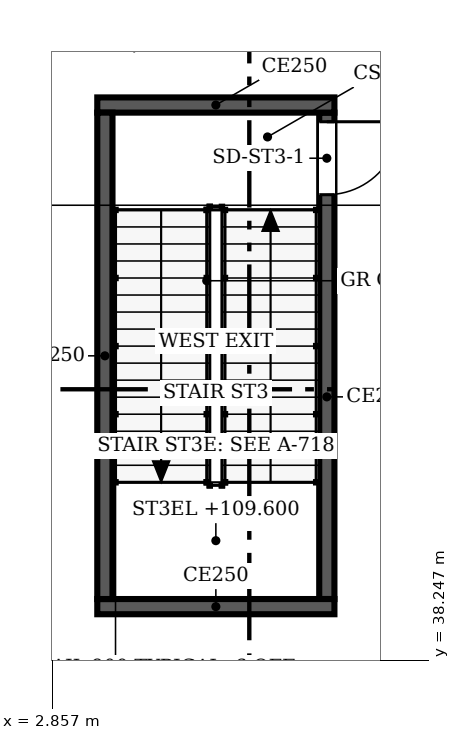
"""IFC4 building model, lengths in metres.
Left out: names, types, materials, properties, quantities, classifications, styles, units other than length and angle.
Written with IfcOpenShell. Run it as: python <this file> out.ifc"""

import sys

from ifc_helpers import new_model, si_unit, direction, frame, frame_2d, origin, place, context, subcontext, project, spatial, rectangle, extrude, source, transform, mapped, element, fill, save


model = new_model("IFC4")
c1 = context("Model", 3, precision=1e-05, world=origin(), true_north=direction((0.0, 1.0)))
c2 = subcontext(c1, "Body", "Model", "MODEL_VIEW")
j1 = project(units=[si_unit("LENGTHUNIT", "METRE"), si_unit("PLANEANGLEUNIT", "RADIAN")], contexts=[c1])
p1 = place(None, origin())
s1 = spatial("IfcSite", under=j1, at=p1, CompositionType="ELEMENT")
p2 = place(p1, origin())
s2 = spatial("IfcBuilding", under=s1, at=p2, CompositionType="ELEMENT")
p3 = place(p2, frame((0.0, 0.0, 106.6)))
s3 = spatial("IfcBuildingStorey", under=s2, at=p3, CompositionType="ELEMENT", Elevation=106.6)
p4 = place(p3, frame((7.5, 39.125, 0.0), z_axis=(0.0, 0.0, 1.0), x_axis=(-1.0, 0.0, 0.0)))
e1 = element("IfcWall", 1, at=p4, inside=s3, PredefinedType="SOLIDWALL", context=c2, shape_type="SweptSolid", body=[
    extrude(rectangle(XDim=3.9, YDim=0.25, at=frame_2d((1.95, 0.0))), origin(), (0.0, 0.0, 1.0), 6.0),
])
p5 = place(p3, frame((3.725, 39.25, 0.0), z_axis=(0.0, 0.0, 1.0), x_axis=(0.0, 1.0, 0.0)))
e2 = element("IfcWall", 2, at=p5, inside=s3, PredefinedType="SOLIDWALL", context=c2, shape_type="SweptSolid", body=[
    extrude(rectangle(XDim=8.0, YDim=0.25, at=frame_2d((4.0, 0.0))), origin(), (0.0, 0.0, 1.0), 6.0),
])
p6 = place(p3, frame((3.6, 47.375, 0.0), z_axis=(0.0, 0.0, 1.0), x_axis=(1.0, 0.0, 0.0)))
e3 = element("IfcWall", 3, at=p6, inside=s3, PredefinedType="SOLIDWALL", context=c2, shape_type="SweptSolid", body=[
    extrude(rectangle(XDim=3.9, YDim=0.25, at=frame_2d((1.95, 0.0))), origin(), (0.0, 0.0, 1.0), 6.0),
])
p7 = place(p3, frame((7.375, 47.25, 0.0), z_axis=(0.0, 0.0, 1.0), x_axis=(0.0, -1.0, 0.0)))
e4 = element("IfcWall", 4, at=p7, inside=s3, PredefinedType="SOLIDWALL", context=c2, shape_type="SweptSolid", body=[
    extrude(rectangle(XDim=8.0, YDim=0.25, at=frame_2d((4.0, 0.0))), origin(), (0.0, 0.0, 1.0), 6.0),
])
m1 = source(origin(), c2, "Body", "SweptSolid", [
    extrude(rectangle(XDim=1.2, YDim=2.1, at=frame_2d((0.6, 1.05))), frame((0.0, 0.135, 0.0), z_axis=(0.0, -1.0, 0.0), x_axis=(1.0, 0.0, 0.0)), (0.0, 0.0, 1.0), 0.27),
])
p8 = place(p7, frame((0.15, 0.0, 0.0)))
e5 = element("IfcOpeningElement", 5, at=p8, cuts=e4, PredefinedType="OPENING", context=c2, shape_type="MappedRepresentation", body=[
    mapped(m1, transform((0.0, 0.0, 0.0), scale=1.0)),
])
m2 = source(origin(), c2, "Body", "SweptSolid", [
    extrude(rectangle(XDim=1.2, YDim=2.1, at=frame_2d((0.6, 1.05))), frame((0.0, 0.025, 0.0), z_axis=(0.0, -1.0, 0.0), x_axis=(1.0, 0.0, 0.0)), (0.0, 0.0, 1.0), 0.05),
])
p9 = place(p8, origin())
e6 = element("IfcDoor", 6, at=p9, inside=s3, OperationType="SINGLE_SWING_LEFT", PredefinedType="DOOR", context=c2, shape_type="MappedRepresentation", body=[
    mapped(m2, transform((0.0, 0.0, 0.0), scale=1.0)),
])
fill(e5, e6)
save(model, sys.argv[1])
